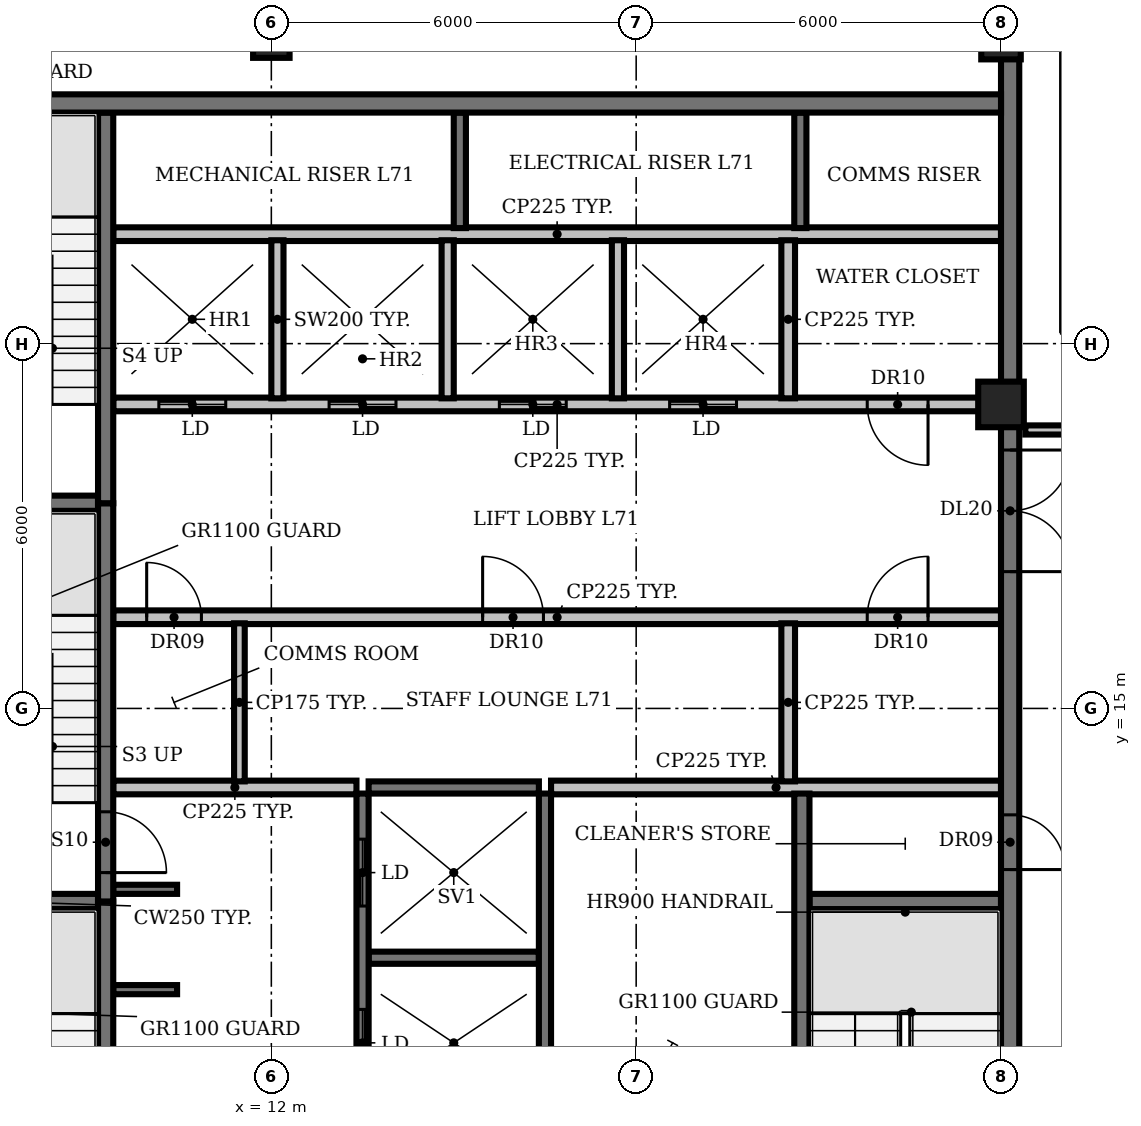
"""IFC4 building model, lengths in metres.
Left out: names, types, materials, properties, quantities, classifications, styles, units other than length and angle.
Written with IfcOpenShell. Run it as: python <this file> out.ifc"""

import sys

from ifc_helpers import new_model, si_unit, direction, frame, frame_2d, origin, origin_2d, place, context, subcontext, project, spatial, rectangle, circle, extrude, element, fill, save


model = new_model("IFC4")
c1 = context("Model", 3, precision=1e-05, world=origin(), true_north=direction((0.0, 1.0)))
c2 = subcontext(c1, "Body", "Model", "MODEL_VIEW")
j1 = project(units=[si_unit("LENGTHUNIT", "METRE"), si_unit("PLANEANGLEUNIT", "RADIAN")], contexts=[c1])
p1 = place(None, origin())
s1 = spatial("IfcSite", under=j1, at=p1, CompositionType="ELEMENT")
p2 = place(p1, origin())
s2 = spatial("IfcBuilding", under=s1, at=p2, CompositionType="ELEMENT")
p3 = place(p2, frame((0.0, 0.0, 318.8)))
s3 = spatial("IfcBuildingStorey", under=s2, at=p3, CompositionType="ELEMENT", Elevation=318.8)
p4 = place(p3, frame((12.0, 26.0, 0.0), z_axis=(0.0, 0.0, 1.0), x_axis=(1.0, 0.0, 0.0)))
e1 = element("IfcColumn", 1, at=p4, inside=s3, PredefinedType="COLUMN", context=c2, shape_type="SweptSolid", body=[
    extrude(rectangle(XDim=0.6, YDim=0.6, at=origin_2d()), origin(), (0.0, 0.0, 1.0), 3.9),
])
p5 = place(p3, frame((24.0, 20.0, 0.0), z_axis=(0.0, 0.0, 1.0), x_axis=(1.0, 0.0, 0.0)))
e2 = element("IfcColumn", 2, at=p5, inside=s3, PredefinedType="COLUMN", context=c2, shape_type="SweptSolid", body=[
    extrude(circle(Radius=0.375, at=origin_2d()), origin(), (0.0, 0.0, 1.0), 3.9),
])
p6 = place(p3, frame((24.0, 26.0, 0.0), z_axis=(0.0, 0.0, 1.0), x_axis=(1.0, 0.0, 0.0)))
e3 = element("IfcColumn", 3, at=p6, inside=s3, PredefinedType="COLUMN", context=c2, shape_type="SweptSolid", body=[
    extrude(rectangle(XDim=0.65, YDim=0.65, at=origin_2d()), origin(), (0.0, 0.0, 1.0), 3.9),
])
p7 = place(p3, frame((9.4, 10.375, 0.0), z_axis=(0.0, 0.0, 1.0), x_axis=(1.0, 0.0, 0.0)))
e4 = element("IfcWall", 4, at=p7, inside=s3, PredefinedType="SHEAR", context=c2, shape_type="SweptSolid", body=[
    extrude(rectangle(XDim=1.05, YDim=0.15, at=frame_2d((0.525, 0.0))), origin(), (0.0, 0.0, 1.0), 3.9),
])
p8 = place(p3, frame((13.6, 10.9, 0.0), z_axis=(0.0, 0.0, 1.0), x_axis=(1.0, 0.0, 0.0)))
e5 = element("IfcWall", 5, at=p8, inside=s3, PredefinedType="SHEAR", context=c2, shape_type="SweptSolid", body=[
    extrude(rectangle(XDim=2.8, YDim=0.2, at=frame_2d((1.4, 0.0))), origin(), (0.0, 0.0, 1.0), 3.9),
])
for number, where, z_axis, x_axis in (
    (6, (6.0, 11.825, 0.0), (0.0, 0.0, 1.0), (1.0, 0.0, 0.0)),
    (7, (20.85, 11.825, 0.0), (0.0, 0.0, 1.0), (1.0, 0.0, 0.0)),
):
    element("IfcWall", number, at=place(p3, frame(where, z_axis=z_axis, x_axis=x_axis)), inside=s3, PredefinedType="SHEAR", context=c2, shape_type="SweptSolid", body=[
        extrude(rectangle(XDim=3.15, YDim=0.25, at=frame_2d((1.575, 0.0))), origin(), (0.0, 0.0, 1.0), 3.9),
    ])
p9 = place(p3, frame((9.4, 12.025, 0.0), z_axis=(0.0, 0.0, 1.0), x_axis=(1.0, 0.0, 0.0)))
e8 = element("IfcWall", 8, at=p9, inside=s3, PredefinedType="SHEAR", context=c2, shape_type="SweptSolid", body=[
    extrude(rectangle(XDim=1.05, YDim=0.15, at=frame_2d((0.525, 0.0))), origin(), (0.0, 0.0, 1.0), 3.9),
])
p10 = place(p3, frame((9.4, 13.7, 0.0), z_axis=(0.0, 0.0, 1.0), x_axis=(1.0, 0.0, 0.0)))
e9 = element("IfcWall", 9, at=p10, inside=s3, PredefinedType="PARTITIONING", context=c2, shape_type="SweptSolid", body=[
    extrude(rectangle(XDim=4.0, YDim=0.225, at=frame_2d((2.0, 0.0))), origin(), (0.0, 0.0, 1.0), 3.9),
])
p11 = place(p3, frame((13.6, 13.7, 0.0), z_axis=(0.0, 0.0, 1.0), x_axis=(1.0, 0.0, 0.0)))
e10 = element("IfcWall", 10, at=p11, inside=s3, PredefinedType="SHEAR", context=c2, shape_type="SweptSolid", body=[
    extrude(rectangle(XDim=2.8, YDim=0.2, at=frame_2d((1.4, 0.0))), origin(), (0.0, 0.0, 1.0), 3.9),
])
p12 = place(p3, frame((16.6, 13.7, 0.0), z_axis=(0.0, 0.0, 1.0), x_axis=(1.0, 0.0, 0.0)))
e11 = element("IfcWall", 11, at=p12, inside=s3, PredefinedType="PARTITIONING", context=c2, shape_type="SweptSolid", body=[
    extrude(rectangle(XDim=7.4, YDim=0.225, at=frame_2d((3.7, 0.0))), origin(), (0.0, 0.0, 1.0), 3.9),
])
p13 = place(p3, frame((9.4, 16.5, 0.0), z_axis=(0.0, 0.0, 1.0), x_axis=(1.0, 0.0, 0.0)))
e12 = element("IfcWall", 12, at=p13, inside=s3, PredefinedType="PARTITIONING", context=c2, shape_type="SweptSolid", body=[
    extrude(rectangle(XDim=14.6, YDim=0.225, at=frame_2d((7.3, 0.0))), origin(), (0.0, 0.0, 1.0), 3.9),
])
p14 = place(p13, frame((0.55, 0.0, 0.0)))
e13 = element("IfcOpeningElement", 13, at=p14, cuts=e12, PredefinedType="OPENING", context=c2, shape_type="SweptSolid", body=[
    extrude(rectangle(XDim=0.9, YDim=2.1, at=frame_2d((0.45, 1.05))), frame((0.0, 0.123, 0.0), z_axis=(0.0, -1.0, 0.0), x_axis=(1.0, 0.0, 0.0)), (0.0, 0.0, 1.0), 0.245),
])
p15 = place(p13, frame((6.075, 0.0, 0.0)))
e14 = element("IfcOpeningElement", 14, at=p15, cuts=e12, PredefinedType="OPENING", context=c2, shape_type="SweptSolid", body=[
    extrude(rectangle(XDim=1.0, YDim=2.1, at=frame_2d((0.5, 1.05))), frame((0.0, 0.123, 0.0), z_axis=(0.0, -1.0, 0.0), x_axis=(1.0, 0.0, 0.0)), (0.0, 0.0, 1.0), 0.245),
])
p16 = place(p13, frame((12.4, 0.0, 0.0)))
e15 = element("IfcOpeningElement", 15, at=p16, cuts=e12, PredefinedType="OPENING", context=c2, shape_type="SweptSolid", body=[
    extrude(rectangle(XDim=1.0, YDim=2.1, at=frame_2d((0.5, 1.05))), frame((0.0, 0.123, 0.0), z_axis=(0.0, -1.0, 0.0), x_axis=(1.0, 0.0, 0.0)), (0.0, 0.0, 1.0), 0.245),
])
p17 = place(p3, frame((6.0, 18.375, 0.0), z_axis=(0.0, 0.0, 1.0), x_axis=(1.0, 0.0, 0.0)))
e16 = element("IfcWall", 16, at=p17, inside=s3, PredefinedType="SHEAR", context=c2, shape_type="SweptSolid", body=[
    extrude(rectangle(XDim=3.15, YDim=0.25, at=frame_2d((1.575, 0.0))), origin(), (0.0, 0.0, 1.0), 3.9),
])
p18 = place(p3, frame((24.0, 20.0, 0.0), z_axis=(0.0, 0.0, 1.0), x_axis=(-1.0, 0.0, 0.0)))
e17 = element("IfcWall", 17, at=p18, inside=s3, PredefinedType="PARTITIONING", context=c2, shape_type="SweptSolid", body=[
    extrude(rectangle(XDim=14.6, YDim=0.225, at=frame_2d((7.3, 0.0))), origin(), (0.0, 0.0, 1.0), 3.9),
])
p19 = place(p18, frame((12.75, 0.0, 0.0)))
e18 = element("IfcOpeningElement", 18, at=p19, cuts=e17, PredefinedType="OPENING", context=c2, shape_type="SweptSolid", body=[
    extrude(rectangle(XDim=1.1, YDim=2.1, at=frame_2d((0.55, 1.05))), frame((0.0, 0.123, 0.0), z_axis=(0.0, -1.0, 0.0), x_axis=(1.0, 0.0, 0.0)), (0.0, 0.0, 1.0), 0.245),
])
p20 = place(p18, frame((9.95, 0.0, 0.0)))
e19 = element("IfcOpeningElement", 19, at=p20, cuts=e17, PredefinedType="OPENING", context=c2, shape_type="SweptSolid", body=[
    extrude(rectangle(XDim=1.1, YDim=2.1, at=frame_2d((0.55, 1.05))), frame((0.0, 0.123, 0.0), z_axis=(0.0, -1.0, 0.0), x_axis=(1.0, 0.0, 0.0)), (0.0, 0.0, 1.0), 0.245),
])
p21 = place(p18, frame((7.15, 0.0, 0.0)))
e20 = element("IfcOpeningElement", 20, at=p21, cuts=e17, PredefinedType="OPENING", context=c2, shape_type="SweptSolid", body=[
    extrude(rectangle(XDim=1.1, YDim=2.1, at=frame_2d((0.55, 1.05))), frame((0.0, 0.123, 0.0), z_axis=(0.0, -1.0, 0.0), x_axis=(1.0, 0.0, 0.0)), (0.0, 0.0, 1.0), 0.245),
])
p22 = place(p18, frame((4.35, 0.0, 0.0)))
e21 = element("IfcOpeningElement", 21, at=p22, cuts=e17, PredefinedType="OPENING", context=c2, shape_type="SweptSolid", body=[
    extrude(rectangle(XDim=1.1, YDim=2.1, at=frame_2d((0.55, 1.05))), frame((0.0, 0.123, 0.0), z_axis=(0.0, -1.0, 0.0), x_axis=(1.0, 0.0, 0.0)), (0.0, 0.0, 1.0), 0.245),
])
p23 = place(p18, frame((1.2, 0.0, 0.0)))
e22 = element("IfcOpeningElement", 22, at=p23, cuts=e17, PredefinedType="OPENING", context=c2, shape_type="SweptSolid", body=[
    extrude(rectangle(XDim=1.0, YDim=2.1, at=frame_2d((0.5, 1.05))), frame((0.0, 0.123, 0.0), z_axis=(0.0, -1.0, 0.0), x_axis=(1.0, 0.0, 0.0)), (0.0, 0.0, 1.0), 0.245),
])
p24 = place(p3, frame((9.4, 22.8, 0.0), z_axis=(0.0, 0.0, 1.0), x_axis=(1.0, 0.0, 0.0)))
e23 = element("IfcWall", 23, at=p24, inside=s3, PredefinedType="PARTITIONING", context=c2, shape_type="SweptSolid", body=[
    extrude(rectangle(XDim=14.6, YDim=0.225, at=frame_2d((7.3, 0.0))), origin(), (0.0, 0.0, 1.0), 3.9),
])
p25 = place(p3, frame((9.275, 11.825, 0.0), z_axis=(0.0, 0.0, 1.0), x_axis=(0.0, -1.0, 0.0)))
e24 = element("IfcWall", 24, at=p25, inside=s3, PredefinedType="SHEAR", context=c2, shape_type="SweptSolid", body=[
    extrude(rectangle(XDim=6.425, YDim=0.25, at=frame_2d((3.212, 0.0))), origin(), (0.0, 0.0, 1.0), 3.9),
])
p26 = place(p25, frame((5.075, 0.0, 0.0)))
e25 = element("IfcOpeningElement", 25, at=p26, cuts=e24, PredefinedType="OPENING", context=c2, shape_type="SweptSolid", body=[
    extrude(rectangle(XDim=1.0, YDim=2.1, at=frame_2d((0.5, 1.05))), frame((0.0, 0.135, 0.0), z_axis=(0.0, -1.0, 0.0), x_axis=(1.0, 0.0, 0.0)), (0.0, 0.0, 1.0), 0.27),
])
p27 = place(p3, frame((9.275, 18.375, 0.0), z_axis=(0.0, 0.0, 1.0), x_axis=(0.0, -1.0, 0.0)))
e26 = element("IfcWall", 26, at=p27, inside=s3, PredefinedType="SHEAR", context=c2, shape_type="SweptSolid", body=[
    extrude(rectangle(XDim=6.55, YDim=0.25, at=frame_2d((3.275, 0.0))), origin(), (0.0, 0.0, 1.0), 3.9),
])
p28 = place(p27, frame((5.075, 0.0, 0.0)))
e27 = element("IfcOpeningElement", 27, at=p28, cuts=e26, PredefinedType="OPENING", context=c2, shape_type="SweptSolid", body=[
    extrude(rectangle(XDim=1.0, YDim=2.1, at=frame_2d((0.5, 1.05))), frame((0.0, 0.135, 0.0), z_axis=(0.0, -1.0, 0.0), x_axis=(1.0, 0.0, 0.0)), (0.0, 0.0, 1.0), 0.27),
])
p29 = place(p3, frame((9.275, 18.375, 0.0), z_axis=(0.0, 0.0, 1.0), x_axis=(0.0, 1.0, 0.0)))
e28 = element("IfcWall", 28, at=p29, inside=s3, PredefinedType="SHEAR", context=c2, shape_type="SweptSolid", body=[
    extrude(rectangle(XDim=6.425, YDim=0.25, at=frame_2d((3.212, 0.0))), origin(), (0.0, 0.0, 1.0), 3.9),
])
p30 = place(p3, frame((11.475, 13.8, 0.0), z_axis=(0.0, 0.0, 1.0), x_axis=(0.0, 1.0, 0.0)))
e29 = element("IfcWall", 29, at=p30, inside=s3, PredefinedType="PARTITIONING", context=c2, shape_type="SweptSolid", body=[
    extrude(rectangle(XDim=2.6, YDim=0.175, at=frame_2d((1.3, 0.0))), origin(), (0.0, 0.0, 1.0), 3.9),
])
p31 = place(p3, frame((12.1, 20.1, 0.0), z_axis=(0.0, 0.0, 1.0), x_axis=(0.0, 1.0, 0.0)))
e30 = element("IfcWall", 30, at=p31, inside=s3, PredefinedType="SOLIDWALL", context=c2, shape_type="SweptSolid", body=[
    extrude(rectangle(XDim=2.6, YDim=0.2, at=frame_2d((1.3, 0.0))), origin(), (0.0, 0.0, 1.0), 3.9),
])
p32 = place(p3, frame((13.5, 5.4, 0.0), z_axis=(0.0, 0.0, 1.0), x_axis=(0.0, 1.0, 0.0)))
e31 = element("IfcWall", 31, at=p32, inside=s3, PredefinedType="SHEAR", context=c2, shape_type="SweptSolid", body=[
    extrude(rectangle(XDim=8.2, YDim=0.2, at=frame_2d((4.1, 0.0))), origin(), (0.0, 0.0, 1.0), 3.9),
])
p33 = place(p32, frame((0.75, 0.0, 0.0)))
e32 = element("IfcOpeningElement", 32, at=p33, cuts=e31, PredefinedType="OPENING", context=c2, shape_type="SweptSolid", body=[
    extrude(rectangle(XDim=1.1, YDim=2.1, at=frame_2d((0.55, 1.05))), frame((0.0, 0.11, 0.0), z_axis=(0.0, -1.0, 0.0), x_axis=(1.0, 0.0, 0.0)), (0.0, 0.0, 1.0), 0.22),
])
p34 = place(p32, frame((3.55, 0.0, 0.0)))
e33 = element("IfcOpeningElement", 33, at=p34, cuts=e31, PredefinedType="OPENING", context=c2, shape_type="SweptSolid", body=[
    extrude(rectangle(XDim=1.1, YDim=2.1, at=frame_2d((0.55, 1.05))), frame((0.0, 0.11, 0.0), z_axis=(0.0, -1.0, 0.0), x_axis=(1.0, 0.0, 0.0)), (0.0, 0.0, 1.0), 0.22),
])
p35 = place(p32, frame((6.35, 0.0, 0.0)))
e34 = element("IfcOpeningElement", 34, at=p35, cuts=e31, PredefinedType="OPENING", context=c2, shape_type="SweptSolid", body=[
    extrude(rectangle(XDim=1.1, YDim=2.1, at=frame_2d((0.55, 1.05))), frame((0.0, 0.11, 0.0), z_axis=(0.0, -1.0, 0.0), x_axis=(1.0, 0.0, 0.0)), (0.0, 0.0, 1.0), 0.22),
])
p36 = place(p3, frame((14.9, 20.1, 0.0), z_axis=(0.0, 0.0, 1.0), x_axis=(0.0, 1.0, 0.0)))
e35 = element("IfcWall", 35, at=p36, inside=s3, PredefinedType="SOLIDWALL", context=c2, shape_type="SweptSolid", body=[
    extrude(rectangle(XDim=2.6, YDim=0.2, at=frame_2d((1.3, 0.0))), origin(), (0.0, 0.0, 1.0), 3.9),
])
p37 = place(p3, frame((15.1, 22.9, 0.0), z_axis=(0.0, 0.0, 1.0), x_axis=(0.0, 1.0, 0.0)))
e36 = element("IfcWall", 36, at=p37, inside=s3, PredefinedType="SHEAR", context=c2, shape_type="SweptSolid", body=[
    extrude(rectangle(XDim=1.9, YDim=0.2, at=frame_2d((0.95, 0.0))), origin(), (0.0, 0.0, 1.0), 3.9),
])
p38 = place(p3, frame((16.5, 5.4, 0.0), z_axis=(0.0, 0.0, 1.0), x_axis=(0.0, 1.0, 0.0)))
e37 = element("IfcWall", 37, at=p38, inside=s3, PredefinedType="SHEAR", context=c2, shape_type="SweptSolid", body=[
    extrude(rectangle(XDim=8.2, YDim=0.2, at=frame_2d((4.1, 0.0))), origin(), (0.0, 0.0, 1.0), 3.9),
])
p39 = place(p3, frame((17.7, 20.1, 0.0), z_axis=(0.0, 0.0, 1.0), x_axis=(0.0, 1.0, 0.0)))
e38 = element("IfcWall", 38, at=p39, inside=s3, PredefinedType="SOLIDWALL", context=c2, shape_type="SweptSolid", body=[
    extrude(rectangle(XDim=2.6, YDim=0.2, at=frame_2d((1.3, 0.0))), origin(), (0.0, 0.0, 1.0), 3.9),
])
for number, where, z_axis, x_axis in (
    (39, (20.5, 13.8, 0.0), (0.0, 0.0, 1.0), (0.0, 1.0, 0.0)),
    (40, (20.5, 20.1, 0.0), (0.0, 0.0, 1.0), (0.0, 1.0, 0.0)),
):
    element("IfcWall", number, at=place(p3, frame(where, z_axis=z_axis, x_axis=x_axis)), inside=s3, PredefinedType="PARTITIONING", context=c2, shape_type="SweptSolid", body=[
        extrude(rectangle(XDim=2.6, YDim=0.225, at=frame_2d((1.3, 0.0))), origin(), (0.0, 0.0, 1.0), 3.9),
    ])
p40 = place(p3, frame((20.7, 22.9, 0.0), z_axis=(0.0, 0.0, 1.0), x_axis=(0.0, 1.0, 0.0)))
e41 = element("IfcWall", 41, at=p40, inside=s3, PredefinedType="SHEAR", context=c2, shape_type="SweptSolid", body=[
    extrude(rectangle(XDim=1.9, YDim=0.2, at=frame_2d((0.95, 0.0))), origin(), (0.0, 0.0, 1.0), 3.9),
])
p41 = place(p3, frame((20.725, 5.4, 0.0), z_axis=(0.0, 0.0, 1.0), x_axis=(0.0, 1.0, 0.0)))
e42 = element("IfcWall", 42, at=p41, inside=s3, PredefinedType="SHEAR", context=c2, shape_type="SweptSolid", body=[
    extrude(rectangle(XDim=8.2, YDim=0.25, at=frame_2d((4.1, 0.0))), origin(), (0.0, 0.0, 1.0), 3.9),
])
p42 = place(p3, frame((24.15, 25.705, 0.0), z_axis=(0.0, 0.0, 1.0), x_axis=(0.0, -1.0, 0.0)))
e43 = element("IfcWall", 43, at=p42, inside=s3, PredefinedType="SHEAR", context=c2, shape_type="SweptSolid", body=[
    extrude(rectangle(XDim=20.605, YDim=0.3, at=frame_2d((10.302, 0.0))), origin(), (0.0, 0.0, 1.0), 3.9),
])
p43 = place(p42, frame((18.555, 0.0, 0.0)))
e44 = element("IfcOpeningElement", 44, at=p43, cuts=e43, PredefinedType="OPENING", context=c2, shape_type="SweptSolid", body=[
    extrude(rectangle(XDim=1.5, YDim=2.1, at=frame_2d((0.75, 1.05))), frame((0.0, 0.16, 0.0), z_axis=(0.0, -1.0, 0.0), x_axis=(1.0, 0.0, 0.0)), (0.0, 0.0, 1.0), 0.32),
])
p44 = place(p42, frame((12.455, 0.0, 0.0)))
e45 = element("IfcOpeningElement", 45, at=p44, cuts=e43, PredefinedType="OPENING", context=c2, shape_type="SweptSolid", body=[
    extrude(rectangle(XDim=0.9, YDim=2.1, at=frame_2d((0.45, 1.05))), frame((0.0, 0.16, 0.0), z_axis=(0.0, -1.0, 0.0), x_axis=(1.0, 0.0, 0.0)), (0.0, 0.0, 1.0), 0.32),
])
p45 = place(p42, frame((6.455, 0.0, 0.0)))
e46 = element("IfcOpeningElement", 46, at=p45, cuts=e43, PredefinedType="OPENING", context=c2, shape_type="SweptSolid", body=[
    extrude(rectangle(XDim=2.0, YDim=2.1, at=frame_2d((1.0, 1.05))), frame((0.0, 0.16, 0.0), z_axis=(0.0, -1.0, 0.0), x_axis=(1.0, 0.0, 0.0)), (0.0, 0.0, 1.0), 0.32),
])
p46 = place(p3, frame((6.0, 24.95, 0.0), z_axis=(0.0, 0.0, 1.0), x_axis=(1.0, 0.0, 0.0)))
e47 = element("IfcWall", 47, at=p46, inside=s3, PredefinedType="SHEAR", context=c2, shape_type="SweptSolid", body=[
    extrude(rectangle(XDim=18.0, YDim=0.3, at=frame_2d((9.0, 0.0))), origin(), (0.0, 0.0, 1.0), 3.9),
])
p47 = place(p3, frame((24.4, 19.58, 0.0), z_axis=(0.0, 0.0, 1.0), x_axis=(1.0, 0.0, 0.0)))
e48 = element("IfcWall", 48, at=p47, inside=s3, PredefinedType="PARTITIONING", context=c2, shape_type="SweptSolid", body=[
    extrude(rectangle(XDim=1.7, YDim=0.15, at=frame_2d((0.85, 0.0))), origin(), (0.0, 0.0, 1.0), 2.95),
])
p48 = place(p14, origin())
e49 = element("IfcDoor", 49, at=p48, inside=s3, OperationType="SINGLE_SWING_LEFT", PredefinedType="DOOR", context=c2, shape_type="SweptSolid", body=[
    extrude(rectangle(XDim=0.9, YDim=2.1, at=frame_2d((0.45, 1.05))), frame((0.0, 0.025, 0.0), z_axis=(0.0, -1.0, 0.0), x_axis=(1.0, 0.0, 0.0)), (0.0, 0.0, 1.0), 0.05),
])
fill(e13, e49)
p49 = place(p15, origin())
e50 = element("IfcDoor", 50, at=p49, inside=s3, OperationType="SINGLE_SWING_LEFT", PredefinedType="DOOR", context=c2, shape_type="SweptSolid", body=[
    extrude(rectangle(XDim=1.0, YDim=2.1, at=frame_2d((0.5, 1.05))), frame((0.0, 0.025, 0.0), z_axis=(0.0, -1.0, 0.0), x_axis=(1.0, 0.0, 0.0)), (0.0, 0.0, 1.0), 0.05),
])
fill(e14, e50)
p50 = place(p16, origin())
e51 = element("IfcDoor", 51, at=p50, inside=s3, OperationType="SINGLE_SWING_RIGHT", PredefinedType="DOOR", context=c2, shape_type="SweptSolid", body=[
    extrude(rectangle(XDim=1.0, YDim=2.1, at=frame_2d((0.5, 1.05))), frame((0.0, 0.025, 0.0), z_axis=(0.0, -1.0, 0.0), x_axis=(1.0, 0.0, 0.0)), (0.0, 0.0, 1.0), 0.05),
])
fill(e15, e51)
p51 = place(p19, origin())
e52 = element("IfcDoor", 52, at=p51, inside=s3, OperationType="DOUBLE_DOOR_SLIDING", PredefinedType="DOOR", context=c2, shape_type="SweptSolid", body=[
    extrude(rectangle(XDim=1.1, YDim=2.1, at=frame_2d((0.55, 1.05))), frame((0.0, 0.025, 0.0), z_axis=(0.0, -1.0, 0.0), x_axis=(1.0, 0.0, 0.0)), (0.0, 0.0, 1.0), 0.05),
])
fill(e18, e52)
p52 = place(p20, origin())
e53 = element("IfcDoor", 53, at=p52, inside=s3, OperationType="DOUBLE_DOOR_SLIDING", PredefinedType="DOOR", context=c2, shape_type="SweptSolid", body=[
    extrude(rectangle(XDim=1.1, YDim=2.1, at=frame_2d((0.55, 1.05))), frame((0.0, 0.025, 0.0), z_axis=(0.0, -1.0, 0.0), x_axis=(1.0, 0.0, 0.0)), (0.0, 0.0, 1.0), 0.05),
])
fill(e19, e53)
p53 = place(p21, origin())
e54 = element("IfcDoor", 54, at=p53, inside=s3, OperationType="DOUBLE_DOOR_SLIDING", PredefinedType="DOOR", context=c2, shape_type="SweptSolid", body=[
    extrude(rectangle(XDim=1.1, YDim=2.1, at=frame_2d((0.55, 1.05))), frame((0.0, 0.025, 0.0), z_axis=(0.0, -1.0, 0.0), x_axis=(1.0, 0.0, 0.0)), (0.0, 0.0, 1.0), 0.05),
])
fill(e20, e54)
p54 = place(p22, origin())
e55 = element("IfcDoor", 55, at=p54, inside=s3, OperationType="DOUBLE_DOOR_SLIDING", PredefinedType="DOOR", context=c2, shape_type="SweptSolid", body=[
    extrude(rectangle(XDim=1.1, YDim=2.1, at=frame_2d((0.55, 1.05))), frame((0.0, 0.025, 0.0), z_axis=(0.0, -1.0, 0.0), x_axis=(1.0, 0.0, 0.0)), (0.0, 0.0, 1.0), 0.05),
])
fill(e21, e55)
p55 = place(p23, origin())
e56 = element("IfcDoor", 56, at=p55, inside=s3, OperationType="SINGLE_SWING_LEFT", PredefinedType="DOOR", context=c2, shape_type="SweptSolid", body=[
    extrude(rectangle(XDim=1.0, YDim=2.1, at=frame_2d((0.5, 1.05))), frame((0.0, 0.025, 0.0), z_axis=(0.0, -1.0, 0.0), x_axis=(1.0, 0.0, 0.0)), (0.0, 0.0, 1.0), 0.05),
])
fill(e22, e56)
p56 = place(p28, origin())
e57 = element("IfcDoor", 57, at=p56, inside=s3, OperationType="SINGLE_SWING_RIGHT", PredefinedType="DOOR", context=c2, shape_type="SweptSolid", body=[
    extrude(rectangle(XDim=1.0, YDim=2.1, at=frame_2d((0.5, 1.05))), frame((0.0, 0.025, 0.0), z_axis=(0.0, -1.0, 0.0), x_axis=(1.0, 0.0, 0.0)), (0.0, 0.0, 1.0), 0.05),
])
fill(e27, e57)
p57 = place(p34, origin())
e58 = element("IfcDoor", 58, at=p57, inside=s3, OperationType="DOUBLE_DOOR_SLIDING", PredefinedType="DOOR", context=c2, shape_type="SweptSolid", body=[
    extrude(rectangle(XDim=1.1, YDim=2.1, at=frame_2d((0.55, 1.05))), frame((0.0, 0.025, 0.0), z_axis=(0.0, -1.0, 0.0), x_axis=(1.0, 0.0, 0.0)), (0.0, 0.0, 1.0), 0.05),
])
fill(e33, e58)
p58 = place(p35, origin())
e59 = element("IfcDoor", 59, at=p58, inside=s3, OperationType="DOUBLE_DOOR_SLIDING", PredefinedType="DOOR", context=c2, shape_type="SweptSolid", body=[
    extrude(rectangle(XDim=1.1, YDim=2.1, at=frame_2d((0.55, 1.05))), frame((0.0, 0.025, 0.0), z_axis=(0.0, -1.0, 0.0), x_axis=(1.0, 0.0, 0.0)), (0.0, 0.0, 1.0), 0.05),
])
fill(e34, e59)
p59 = place(p44, origin())
e60 = element("IfcDoor", 60, at=p59, inside=s3, OperationType="SINGLE_SWING_RIGHT", PredefinedType="DOOR", context=c2, shape_type="SweptSolid", body=[
    extrude(rectangle(XDim=0.9, YDim=2.1, at=frame_2d((0.45, 1.05))), frame((0.0, 0.025, 0.0), z_axis=(0.0, -1.0, 0.0), x_axis=(1.0, 0.0, 0.0)), (0.0, 0.0, 1.0), 0.05),
])
fill(e45, e60)
p60 = place(p45, origin())
e61 = element("IfcDoor", 61, at=p60, inside=s3, OperationType="DOUBLE_DOOR_SINGLE_SWING", PredefinedType="DOOR", context=c2, shape_type="SweptSolid", body=[
    extrude(rectangle(XDim=2.0, YDim=2.1, at=frame_2d((1.0, 1.05))), frame((0.0, 0.025, 0.0), z_axis=(0.0, -1.0, 0.0), x_axis=(1.0, 0.0, 0.0)), (0.0, 0.0, 1.0), 0.05),
])
fill(e46, e61)
save(model, sys.argv[1])
